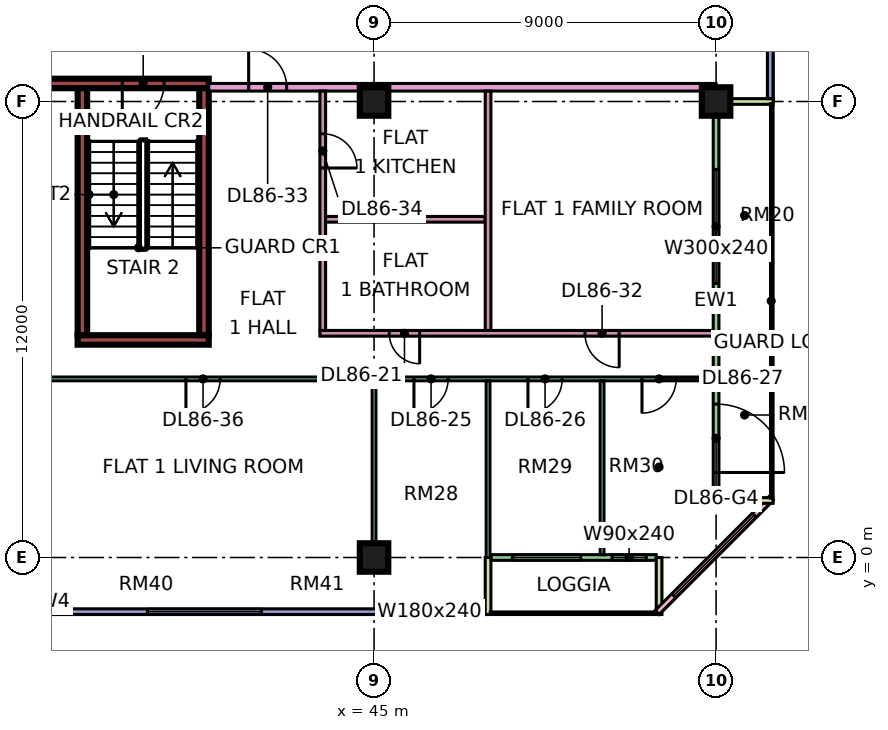
"""IFC4 building model, lengths in metres.
Left out: names, types, materials, properties, quantities, classifications, styles, units other than length and angle.
Written with IfcOpenShell. Run it as: python <this file> out.ifc"""

import sys

from ifc_helpers import new_model, si_unit, direction, frame, frame_2d, origin, origin_2d, place, context, subcontext, project, spatial, rectangle, extrude, element, fill, save


model = new_model("IFC4")
c1 = context("Model", 3, precision=1e-05, world=origin(), true_north=direction((0.0, 1.0)))
c2 = subcontext(c1, "Body", "Model", "MODEL_VIEW")
j1 = project(units=[si_unit("LENGTHUNIT", "METRE"), si_unit("PLANEANGLEUNIT", "RADIAN")], contexts=[c1])
p1 = place(None, origin())
s1 = spatial("IfcSite", under=j1, at=p1, CompositionType="ELEMENT")
p2 = place(p1, origin())
s2 = spatial("IfcBuilding", under=s1, at=p2, CompositionType="ELEMENT")
p3 = place(p2, frame((0.0, 0.0, 368.9)))
s3 = spatial("IfcBuildingStorey", under=s2, at=p3, CompositionType="ELEMENT", Elevation=368.9)
for number, where, z_axis, x_axis in (
    (1, (45.0, 0.0, 0.0), (0.0, 0.0, 1.0), (1.0, 0.0, 0.0)),
    (2, (45.0, 12.0, 0.0), (0.0, 0.0, 1.0), (1.0, 0.0, 0.0)),
    (3, (54.0, 12.0, 0.0), (0.0, 0.0, 1.0), (1.0, 0.0, 0.0)),
):
    element("IfcColumn", number, at=place(p3, frame(where, z_axis=z_axis, x_axis=x_axis)), inside=s3, PredefinedType="COLUMN", context=c2, shape_type="SweptSolid", body=[
        extrude(rectangle(XDim=0.75, YDim=0.75, at=origin_2d()), origin(), (0.0, 0.0, 1.0), 3.75),
    ])
p4 = place(p3, frame((37.2, 5.725, 0.0), z_axis=(0.0, 0.0, 1.0), x_axis=(1.0, 0.0, 0.0)))
e4 = element("IfcWall", 4, at=p4, inside=s3, PredefinedType="SHEAR", context=c2, shape_type="SweptSolid", body=[
    extrude(rectangle(XDim=3.45, YDim=0.25, at=frame_2d((1.725, 0.0))), origin(), (0.0, 0.0, 1.0), 3.75),
])
p5 = place(p3, frame((36.375, 12.475, 0.0), z_axis=(0.0, 0.0, 1.0), x_axis=(1.0, 0.0, 0.0)))
e5 = element("IfcWall", 5, at=p5, inside=s3, PredefinedType="SHEAR", context=c2, shape_type="SweptSolid", body=[
    extrude(rectangle(XDim=4.275, YDim=0.25, at=frame_2d((2.137, 0.0))), origin(), (0.0, 0.0, 1.0), 3.75),
])
p6 = place(p5, frame((2.0, 0.0, 0.0)))
e6 = element("IfcOpeningElement", 6, at=p6, cuts=e5, PredefinedType="OPENING", context=c2, shape_type="SweptSolid", body=[
    extrude(rectangle(XDim=1.1, YDim=2.2, at=frame_2d((0.55, 1.1))), frame((0.0, 0.135, 0.0), z_axis=(0.0, -1.0, 0.0), x_axis=(1.0, 0.0, 0.0)), (0.0, 0.0, 1.0), 0.27),
])
for number, where, z_axis, x_axis in (
    (7, (37.325, 5.85, 0.0), (0.0, 0.0, 1.0), (0.0, 1.0, 0.0)),
    (8, (40.525, 5.85, 0.0), (0.0, 0.0, 1.0), (0.0, 1.0, 0.0)),
):
    element("IfcWall", number, at=place(p3, frame(where, z_axis=z_axis, x_axis=x_axis)), inside=s3, PredefinedType="SHEAR", context=c2, shape_type="SweptSolid", body=[
        extrude(rectangle(XDim=6.5, YDim=0.25, at=frame_2d((3.25, 0.0))), origin(), (0.0, 0.0, 1.0), 3.75),
    ])
p7 = place(p3, frame((36.075, -1.425, 0.0), z_axis=(0.0, 0.0, 1.0), x_axis=(1.0, 0.0, 0.0)))
e9 = element("IfcWall", 9, at=p7, inside=s3, PredefinedType="SOLIDWALL", context=c2, shape_type="SweptSolid", body=[
    extrude(rectangle(XDim=11.85, YDim=0.15, at=frame_2d((5.925, 0.0))), origin(), (0.0, 0.0, 1.0), 3.35),
])
p8 = place(p7, frame((2.962, 0.0, 0.45)))
e10 = element("IfcOpeningElement", 10, at=p8, cuts=e9, PredefinedType="OPENING", context=c2, shape_type="SweptSolid", body=[
    extrude(rectangle(XDim=3.0, YDim=2.4, at=frame_2d((1.5, 1.2))), frame((0.0, 0.085, 0.0), z_axis=(0.0, -1.0, 0.0), x_axis=(1.0, 0.0, 0.0)), (0.0, 0.0, 1.0), 0.17),
])
p9 = place(p7, frame((9.488, 0.0, 0.45)))
e11 = element("IfcOpeningElement", 11, at=p9, cuts=e9, PredefinedType="OPENING", context=c2, shape_type="SweptSolid", body=[
    extrude(rectangle(XDim=1.8, YDim=2.4, at=frame_2d((0.9, 1.2))), frame((0.0, 0.085, 0.0), z_axis=(0.0, -1.0, 0.0), x_axis=(1.0, 0.0, 0.0)), (0.0, 0.0, 1.0), 0.17),
])
p10 = place(p3, frame((48.075, 0.0, 0.0), z_axis=(0.0, 0.0, 1.0), x_axis=(1.0, 0.0, 0.0)))
e12 = element("IfcWall", 12, at=p10, inside=s3, PredefinedType="SOLIDWALL", context=c2, shape_type="SweptSolid", body=[
    extrude(rectangle(XDim=4.35, YDim=0.15, at=frame_2d((2.175, 0.0))), origin(), (0.0, 0.0, 1.0), 3.35),
])
p11 = place(p10, frame((0.562, 0.0, 0.45)))
e13 = element("IfcOpeningElement", 13, at=p11, cuts=e12, PredefinedType="OPENING", context=c2, shape_type="SweptSolid", body=[
    extrude(rectangle(XDim=1.8, YDim=2.4, at=frame_2d((0.9, 1.2))), frame((0.0, 0.085, 0.0), z_axis=(0.0, -1.0, 0.0), x_axis=(1.0, 0.0, 0.0)), (0.0, 0.0, 1.0), 0.17),
])
p12 = place(p10, frame((3.188, 0.0, 0.45)))
e14 = element("IfcOpeningElement", 14, at=p12, cuts=e12, PredefinedType="OPENING", context=c2, shape_type="SweptSolid", body=[
    extrude(rectangle(XDim=0.9, YDim=2.4, at=frame_2d((0.45, 1.2))), frame((0.0, 0.085, 0.0), z_axis=(0.0, -1.0, 0.0), x_axis=(1.0, 0.0, 0.0)), (0.0, 0.0, 1.0), 0.17),
])
for number, where, z_axis, x_axis in (
    (15, (48.0, -1.5, 0.0), (0.0, 0.0, 1.0), (0.0, 1.0, 0.0)),
    (16, (52.5, -1.5, 0.0), (0.0, 0.0, 1.0), (0.0, 1.0, 0.0)),
):
    element("IfcWall", number, at=place(p3, frame(where, z_axis=z_axis, x_axis=x_axis)), inside=s3, PredefinedType="SOLIDWALL", context=c2, shape_type="SweptSolid", body=[
        extrude(rectangle(XDim=1.5, YDim=0.15, at=frame_2d((0.75, 0.0))), origin(), (0.0, 0.0, 1.0), 3.35),
    ])
p13 = place(p3, frame((52.447, -1.447, 0.0), z_axis=(0.0, 0.0, 1.0), x_axis=(0.707106781187, 0.707106781187, 0.0)))
e17 = element("IfcWall", 17, at=p13, inside=s3, PredefinedType="SOLIDWALL", context=c2, shape_type="SweptSolid", body=[
    extrude(rectangle(XDim=4.243, YDim=0.15, at=frame_2d((2.121, 0.0))), origin(), (0.0, 0.0, 1.0), 3.35),
])
p14 = place(p13, frame((0.621, 0.0, 0.45)))
e18 = element("IfcOpeningElement", 18, at=p14, cuts=e17, PredefinedType="OPENING", context=c2, shape_type="SweptSolid", body=[
    extrude(rectangle(XDim=3.0, YDim=2.4, at=frame_2d((1.5, 1.2))), frame((0.0, 0.085, 0.0), z_axis=(0.0, -1.0, 0.0), x_axis=(1.0, 0.0, 0.0)), (0.0, 0.0, 1.0), 0.17),
])
p15 = place(p3, frame((54.0, 1.575, 0.0), z_axis=(0.0, 0.0, 1.0), x_axis=(0.0, 1.0, 0.0)))
e19 = element("IfcWall", 19, at=p15, inside=s3, PredefinedType="SOLIDWALL", context=c2, shape_type="SweptSolid", body=[
    extrude(rectangle(XDim=10.35, YDim=0.15, at=frame_2d((5.175, 0.0))), origin(), (0.0, 0.0, 1.0), 3.35),
])
p16 = place(p15, frame((0.663, 0.0, 0.0)))
e20 = element("IfcOpeningElement", 20, at=p16, cuts=e19, PredefinedType="OPENING", context=c2, shape_type="SweptSolid", body=[
    extrude(rectangle(XDim=1.8, YDim=2.4, at=frame_2d((0.9, 1.2))), frame((0.0, 0.085, 0.0), z_axis=(0.0, -1.0, 0.0), x_axis=(1.0, 0.0, 0.0)), (0.0, 0.0, 1.0), 0.17),
])
p17 = place(p15, frame((5.637, 0.0, 0.45)))
e21 = element("IfcOpeningElement", 21, at=p17, cuts=e19, PredefinedType="OPENING", context=c2, shape_type="SweptSolid", body=[
    extrude(rectangle(XDim=3.0, YDim=2.4, at=frame_2d((1.5, 1.2))), frame((0.0, 0.085, 0.0), z_axis=(0.0, -1.0, 0.0), x_axis=(1.0, 0.0, 0.0)), (0.0, 0.0, 1.0), 0.17),
])
for number, where, z_axis, x_axis in (
    (22, (55.5, 1.5, 0.0), (0.0, 0.0, 1.0), (-1.0, 0.0, 0.0)),
    (23, (55.5, 12.0, 0.0), (0.0, 0.0, 1.0), (-1.0, 0.0, 0.0)),
):
    element("IfcWall", number, at=place(p3, frame(where, z_axis=z_axis, x_axis=x_axis)), inside=s3, PredefinedType="SOLIDWALL", context=c2, shape_type="SweptSolid", body=[
        extrude(rectangle(XDim=1.5, YDim=0.15, at=frame_2d((0.75, 0.0))), origin(), (0.0, 0.0, 1.0), 3.35),
    ])
p18 = place(p3, frame((55.425, 12.075, 0.0), z_axis=(0.0, 0.0, 1.0), x_axis=(0.0, 1.0, 0.0)))
e24 = element("IfcWall", 24, at=p18, inside=s3, PredefinedType="SOLIDWALL", context=c2, shape_type="SweptSolid", body=[
    extrude(rectangle(XDim=10.425, YDim=0.15, at=frame_2d((5.212, 0.0))), origin(), (0.0, 0.0, 1.0), 3.35),
])
p19 = place(p18, frame((4.575, 0.0, 0.45)))
e25 = element("IfcOpeningElement", 25, at=p19, cuts=e24, PredefinedType="OPENING", context=c2, shape_type="SweptSolid", body=[
    extrude(rectangle(XDim=4.8, YDim=2.4, at=frame_2d((2.4, 1.2))), frame((0.0, 0.085, 0.0), z_axis=(0.0, -1.0, 0.0), x_axis=(1.0, 0.0, 0.0)), (0.0, 0.0, 1.0), 0.17),
])
p20 = place(p3, frame((33.05, 4.7, 0.0), z_axis=(0.0, 0.0, 1.0), x_axis=(1.0, 0.0, 0.0)))
e26 = element("IfcWall", 26, at=p20, inside=s3, PredefinedType="PARTITIONING", context=c2, shape_type="SweptSolid", body=[
    extrude(rectangle(XDim=20.876, YDim=0.1, at=frame_2d((10.438, 0.0))), origin(), (0.0, 0.0, 1.0), 3.35),
])
p21 = place(p20, frame((1.0, 0.0, 0.0)))
e27 = element("IfcOpeningElement", 27, at=p21, cuts=e26, PredefinedType="OPENING", context=c2, shape_type="SweptSolid", body=[
    extrude(rectangle(XDim=0.9, YDim=2.1, at=frame_2d((0.45, 1.05))), frame((0.0, 0.06, 0.0), z_axis=(0.0, -1.0, 0.0), x_axis=(1.0, 0.0, 0.0)), (0.0, 0.0, 1.0), 0.12),
])
p22 = place(p20, frame((13.0, 0.0, 0.0)))
e28 = element("IfcOpeningElement", 28, at=p22, cuts=e26, PredefinedType="OPENING", context=c2, shape_type="SweptSolid", body=[
    extrude(rectangle(XDim=0.9, YDim=2.1, at=frame_2d((0.45, 1.05))), frame((0.0, 0.06, 0.0), z_axis=(0.0, -1.0, 0.0), x_axis=(1.0, 0.0, 0.0)), (0.0, 0.0, 1.0), 0.12),
])
p23 = place(p20, frame((16.0, 0.0, 0.0)))
e29 = element("IfcOpeningElement", 29, at=p23, cuts=e26, PredefinedType="OPENING", context=c2, shape_type="SweptSolid", body=[
    extrude(rectangle(XDim=0.9, YDim=2.1, at=frame_2d((0.45, 1.05))), frame((0.0, 0.06, 0.0), z_axis=(0.0, -1.0, 0.0), x_axis=(1.0, 0.0, 0.0)), (0.0, 0.0, 1.0), 0.12),
])
p24 = place(p20, frame((19.0, 0.0, 0.0)))
e30 = element("IfcOpeningElement", 30, at=p24, cuts=e26, PredefinedType="OPENING", context=c2, shape_type="SweptSolid", body=[
    extrude(rectangle(XDim=0.9, YDim=2.1, at=frame_2d((0.45, 1.05))), frame((0.0, 0.06, 0.0), z_axis=(0.0, -1.0, 0.0), x_axis=(1.0, 0.0, 0.0)), (0.0, 0.0, 1.0), 0.12),
])
p25 = place(p20, frame((7.0, 0.0, 0.0)))
e31 = element("IfcOpeningElement", 31, at=p25, cuts=e26, PredefinedType="OPENING", context=c2, shape_type="SweptSolid", body=[
    extrude(rectangle(XDim=0.9, YDim=2.1, at=frame_2d((0.45, 1.05))), frame((0.0, 0.06, 0.0), z_axis=(0.0, -1.0, 0.0), x_axis=(1.0, 0.0, 0.0)), (0.0, 0.0, 1.0), 0.12),
])
p26 = place(p3, frame((40.65, 12.375, 0.0), z_axis=(0.0, 0.0, 1.0), x_axis=(1.0, 0.0, 0.0)))
e32 = element("IfcWall", 32, at=p26, inside=s3, PredefinedType="PARTITIONING", context=c2, shape_type="SweptSolid", body=[
    extrude(rectangle(XDim=13.35, YDim=0.2, at=frame_2d((6.675, 0.0))), origin(), (0.0, 0.0, 1.0), 3.35),
])
p27 = place(p26, frame((1.05, 0.0, 0.0)))
e33 = element("IfcOpeningElement", 33, at=p27, cuts=e32, PredefinedType="OPENING", context=c2, shape_type="SweptSolid", body=[
    extrude(rectangle(XDim=1.0, YDim=2.1, at=frame_2d((0.5, 1.05))), frame((0.0, 0.11, 0.0), z_axis=(0.0, -1.0, 0.0), x_axis=(1.0, 0.0, 0.0)), (0.0, 0.0, 1.0), 0.22),
])
p28 = place(p3, frame((43.575, 5.9, 0.0), z_axis=(0.0, 0.0, 1.0), x_axis=(1.0, 0.0, 0.0)))
e34 = element("IfcWall", 34, at=p28, inside=s3, PredefinedType="PARTITIONING", context=c2, shape_type="SweptSolid", body=[
    extrude(rectangle(XDim=10.351, YDim=0.15, at=frame_2d((5.176, 0.0))), origin(), (0.0, 0.0, 1.0), 3.35),
])
p29 = place(p28, frame((1.825, 0.0, 0.0)))
e35 = element("IfcOpeningElement", 35, at=p29, cuts=e34, PredefinedType="OPENING", context=c2, shape_type="SweptSolid", body=[
    extrude(rectangle(XDim=0.8, YDim=2.1, at=frame_2d((0.4, 1.05))), frame((0.0, 0.085, 0.0), z_axis=(0.0, -1.0, 0.0), x_axis=(1.0, 0.0, 0.0)), (0.0, 0.0, 1.0), 0.17),
])
p30 = place(p28, frame((6.975, 0.0, 0.0)))
e36 = element("IfcOpeningElement", 36, at=p30, cuts=e34, PredefinedType="OPENING", context=c2, shape_type="SweptSolid", body=[
    extrude(rectangle(XDim=0.9, YDim=2.1, at=frame_2d((0.45, 1.05))), frame((0.0, 0.085, 0.0), z_axis=(0.0, -1.0, 0.0), x_axis=(1.0, 0.0, 0.0)), (0.0, 0.0, 1.0), 0.17),
])
p31 = place(p3, frame((43.65, 5.975, 0.0), z_axis=(0.0, 0.0, 1.0), x_axis=(0.0, 1.0, 0.0)))
e37 = element("IfcWall", 37, at=p31, inside=s3, PredefinedType="PARTITIONING", context=c2, shape_type="SweptSolid", body=[
    extrude(rectangle(XDim=6.3, YDim=0.15, at=frame_2d((3.15, 0.0))), origin(), (0.0, 0.0, 1.0), 3.35),
])
p32 = place(p31, frame((4.275, 0.0, 0.0)))
e38 = element("IfcOpeningElement", 38, at=p32, cuts=e37, PredefinedType="OPENING", context=c2, shape_type="SweptSolid", body=[
    extrude(rectangle(XDim=0.9, YDim=2.1, at=frame_2d((0.45, 1.05))), frame((0.0, 0.085, 0.0), z_axis=(0.0, -1.0, 0.0), x_axis=(1.0, 0.0, 0.0)), (0.0, 0.0, 1.0), 0.17),
])
p33 = place(p3, frame((43.725, 8.9, 0.0), z_axis=(0.0, 0.0, 1.0), x_axis=(1.0, 0.0, 0.0)))
e39 = element("IfcWall", 39, at=p33, inside=s3, PredefinedType="PARTITIONING", context=c2, shape_type="SweptSolid", body=[
    extrude(rectangle(XDim=4.2, YDim=0.15, at=frame_2d((2.1, 0.0))), origin(), (0.0, 0.0, 1.0), 3.35),
])
for number, where, z_axis, x_axis in (
    (40, (45.0, 0.0, 0.0), (0.0, 0.0, 1.0), (0.0, 1.0, 0.0)),
    (41, (48.0, 0.0, 0.0), (0.0, 0.0, 1.0), (0.0, 1.0, 0.0)),
):
    element("IfcWall", number, at=place(p3, frame(where, z_axis=z_axis, x_axis=x_axis)), inside=s3, PredefinedType="PARTITIONING", context=c2, shape_type="SweptSolid", body=[
        extrude(rectangle(XDim=4.65, YDim=0.1, at=frame_2d((2.325, 0.0))), origin(), (0.0, 0.0, 1.0), 3.35),
    ])
p34 = place(p3, frame((48.0, 5.975, 0.0), z_axis=(0.0, 0.0, 1.0), x_axis=(0.0, 1.0, 0.0)))
e42 = element("IfcWall", 42, at=p34, inside=s3, PredefinedType="PARTITIONING", context=c2, shape_type="SweptSolid", body=[
    extrude(rectangle(XDim=6.3, YDim=0.15, at=frame_2d((3.15, 0.0))), origin(), (0.0, 0.0, 1.0), 3.35),
])
p35 = place(p3, frame((51.0, 0.074, 0.0), z_axis=(0.0, 0.0, 1.0), x_axis=(0.0, 1.0, 0.0)))
e43 = element("IfcWall", 43, at=p35, inside=s3, PredefinedType="PARTITIONING", context=c2, shape_type="SweptSolid", body=[
    extrude(rectangle(XDim=4.576, YDim=0.1, at=frame_2d((2.288, 0.0))), origin(), (0.0, 0.0, 1.0), 3.35),
])
p36 = place(p8, origin())
e44 = element("IfcWindow", 44, at=p36, inside=s3, PartitioningType="SINGLE_PANEL", PredefinedType="WINDOW", context=c2, shape_type="SweptSolid", body=[
    extrude(rectangle(XDim=3.0, YDim=2.4, at=frame_2d((1.5, 1.2))), frame((0.0, 0.03, 0.0), z_axis=(0.0, -1.0, 0.0), x_axis=(1.0, 0.0, 0.0)), (0.0, 0.0, 1.0), 0.06),
])
fill(e10, e44)
p37 = place(p9, origin())
e45 = element("IfcWindow", 45, at=p37, inside=s3, PartitioningType="SINGLE_PANEL", PredefinedType="WINDOW", context=c2, shape_type="SweptSolid", body=[
    extrude(rectangle(XDim=1.8, YDim=2.4, at=frame_2d((0.9, 1.2))), frame((0.0, 0.03, 0.0), z_axis=(0.0, -1.0, 0.0), x_axis=(1.0, 0.0, 0.0)), (0.0, 0.0, 1.0), 0.06),
])
fill(e11, e45)
p38 = place(p11, origin())
e46 = element("IfcWindow", 46, at=p38, inside=s3, PartitioningType="SINGLE_PANEL", PredefinedType="WINDOW", context=c2, shape_type="SweptSolid", body=[
    extrude(rectangle(XDim=1.8, YDim=2.4, at=frame_2d((0.9, 1.2))), frame((0.0, 0.03, 0.0), z_axis=(0.0, -1.0, 0.0), x_axis=(1.0, 0.0, 0.0)), (0.0, 0.0, 1.0), 0.06),
])
fill(e13, e46)
p39 = place(p12, origin())
e47 = element("IfcWindow", 47, at=p39, inside=s3, PartitioningType="SINGLE_PANEL", PredefinedType="WINDOW", context=c2, shape_type="SweptSolid", body=[
    extrude(rectangle(XDim=0.9, YDim=2.4, at=frame_2d((0.45, 1.2))), frame((0.0, 0.03, 0.0), z_axis=(0.0, -1.0, 0.0), x_axis=(1.0, 0.0, 0.0)), (0.0, 0.0, 1.0), 0.06),
])
fill(e14, e47)
p40 = place(p14, origin())
e48 = element("IfcWindow", 48, at=p40, inside=s3, PartitioningType="SINGLE_PANEL", PredefinedType="WINDOW", context=c2, shape_type="SweptSolid", body=[
    extrude(rectangle(XDim=3.0, YDim=2.4, at=frame_2d((1.5, 1.2))), frame((0.0, 0.03, 0.0), z_axis=(0.0, -1.0, 0.0), x_axis=(1.0, 0.0, 0.0)), (0.0, 0.0, 1.0), 0.06),
])
fill(e18, e48)
p41 = place(p16, frame((1.8, 0.0, 0.0), z_axis=(0.0, 0.0, 1.0), x_axis=(-1.0, 0.0, 0.0)))
e49 = element("IfcDoor", 49, at=p41, inside=s3, OperationType="DOUBLE_DOOR_SINGLE_SWING", PredefinedType="DOOR", context=c2, shape_type="SweptSolid", body=[
    extrude(rectangle(XDim=1.8, YDim=2.4, at=frame_2d((0.9, 1.2))), frame((0.0, 0.025, 0.0), z_axis=(0.0, -1.0, 0.0), x_axis=(1.0, 0.0, 0.0)), (0.0, 0.0, 1.0), 0.05),
])
fill(e20, e49)
p42 = place(p17, origin())
e50 = element("IfcWindow", 50, at=p42, inside=s3, PartitioningType="SINGLE_PANEL", PredefinedType="WINDOW", context=c2, shape_type="SweptSolid", body=[
    extrude(rectangle(XDim=3.0, YDim=2.4, at=frame_2d((1.5, 1.2))), frame((0.0, 0.03, 0.0), z_axis=(0.0, -1.0, 0.0), x_axis=(1.0, 0.0, 0.0)), (0.0, 0.0, 1.0), 0.06),
])
fill(e21, e50)
p43 = place(p6, frame((1.1, 0.0, 0.0), z_axis=(0.0, 0.0, 1.0), x_axis=(-1.0, 0.0, 0.0)))
e51 = element("IfcDoor", 51, at=p43, inside=s3, OperationType="SINGLE_SWING_LEFT", PredefinedType="DOOR", context=c2, shape_type="SweptSolid", body=[
    extrude(rectangle(XDim=1.1, YDim=2.2, at=frame_2d((0.55, 1.1))), frame((0.0, 0.025, 0.0), z_axis=(0.0, -1.0, 0.0), x_axis=(1.0, 0.0, 0.0)), (0.0, 0.0, 1.0), 0.05),
])
fill(e6, e51)
p44 = place(p29, origin())
e52 = element("IfcDoor", 52, at=p44, inside=s3, OperationType="SINGLE_SWING_RIGHT", PredefinedType="DOOR", context=c2, shape_type="SweptSolid", body=[
    extrude(rectangle(XDim=0.8, YDim=2.1, at=frame_2d((0.4, 1.05))), frame((0.0, 0.025, 0.0), z_axis=(0.0, -1.0, 0.0), x_axis=(1.0, 0.0, 0.0)), (0.0, 0.0, 1.0), 0.05),
])
fill(e35, e52)
p45 = place(p22, frame((0.9, 0.0, 0.0), z_axis=(0.0, 0.0, 1.0), x_axis=(-1.0, 0.0, 0.0)))
e53 = element("IfcDoor", 53, at=p45, inside=s3, OperationType="SINGLE_SWING_LEFT", PredefinedType="DOOR", context=c2, shape_type="SweptSolid", body=[
    extrude(rectangle(XDim=0.9, YDim=2.1, at=frame_2d((0.45, 1.05))), frame((0.0, 0.025, 0.0), z_axis=(0.0, -1.0, 0.0), x_axis=(1.0, 0.0, 0.0)), (0.0, 0.0, 1.0), 0.05),
])
fill(e28, e53)
p46 = place(p23, frame((0.9, 0.0, 0.0), z_axis=(0.0, 0.0, 1.0), x_axis=(-1.0, 0.0, 0.0)))
e54 = element("IfcDoor", 54, at=p46, inside=s3, OperationType="SINGLE_SWING_LEFT", PredefinedType="DOOR", context=c2, shape_type="SweptSolid", body=[
    extrude(rectangle(XDim=0.9, YDim=2.1, at=frame_2d((0.45, 1.05))), frame((0.0, 0.025, 0.0), z_axis=(0.0, -1.0, 0.0), x_axis=(1.0, 0.0, 0.0)), (0.0, 0.0, 1.0), 0.05),
])
fill(e29, e54)
p47 = place(p24, frame((0.9, 0.0, 0.0), z_axis=(0.0, 0.0, 1.0), x_axis=(-1.0, 0.0, 0.0)))
e55 = element("IfcDoor", 55, at=p47, inside=s3, OperationType="SINGLE_SWING_LEFT", PredefinedType="DOOR", context=c2, shape_type="SweptSolid", body=[
    extrude(rectangle(XDim=0.9, YDim=2.1, at=frame_2d((0.45, 1.05))), frame((0.0, 0.025, 0.0), z_axis=(0.0, -1.0, 0.0), x_axis=(1.0, 0.0, 0.0)), (0.0, 0.0, 1.0), 0.05),
])
fill(e30, e55)
p48 = place(p30, origin())
e56 = element("IfcDoor", 56, at=p48, inside=s3, OperationType="SINGLE_SWING_RIGHT", PredefinedType="DOOR", context=c2, shape_type="SweptSolid", body=[
    extrude(rectangle(XDim=0.9, YDim=2.1, at=frame_2d((0.45, 1.05))), frame((0.0, 0.025, 0.0), z_axis=(0.0, -1.0, 0.0), x_axis=(1.0, 0.0, 0.0)), (0.0, 0.0, 1.0), 0.05),
])
fill(e36, e56)
p49 = place(p27, origin())
e57 = element("IfcDoor", 57, at=p49, inside=s3, OperationType="SINGLE_SWING_LEFT", PredefinedType="DOOR", context=c2, shape_type="SweptSolid", body=[
    extrude(rectangle(XDim=1.0, YDim=2.1, at=frame_2d((0.5, 1.05))), frame((0.0, 0.025, 0.0), z_axis=(0.0, -1.0, 0.0), x_axis=(1.0, 0.0, 0.0)), (0.0, 0.0, 1.0), 0.05),
])
fill(e33, e57)
p50 = place(p32, frame((0.9, 0.0, 0.0), z_axis=(0.0, 0.0, 1.0), x_axis=(-1.0, 0.0, 0.0)))
e58 = element("IfcDoor", 58, at=p50, inside=s3, OperationType="SINGLE_SWING_LEFT", PredefinedType="DOOR", context=c2, shape_type="SweptSolid", body=[
    extrude(rectangle(XDim=0.9, YDim=2.1, at=frame_2d((0.45, 1.05))), frame((0.0, 0.025, 0.0), z_axis=(0.0, -1.0, 0.0), x_axis=(1.0, 0.0, 0.0)), (0.0, 0.0, 1.0), 0.05),
])
fill(e38, e58)
p51 = place(p25, frame((0.9, 0.0, 0.0), z_axis=(0.0, 0.0, 1.0), x_axis=(-1.0, 0.0, 0.0)))
e59 = element("IfcDoor", 59, at=p51, inside=s3, OperationType="SINGLE_SWING_LEFT", PredefinedType="DOOR", context=c2, shape_type="SweptSolid", body=[
    extrude(rectangle(XDim=0.9, YDim=2.1, at=frame_2d((0.45, 1.05))), frame((0.0, 0.025, 0.0), z_axis=(0.0, -1.0, 0.0), x_axis=(1.0, 0.0, 0.0)), (0.0, 0.0, 1.0), 0.05),
])
fill(e31, e59)
save(model, sys.argv[1])
